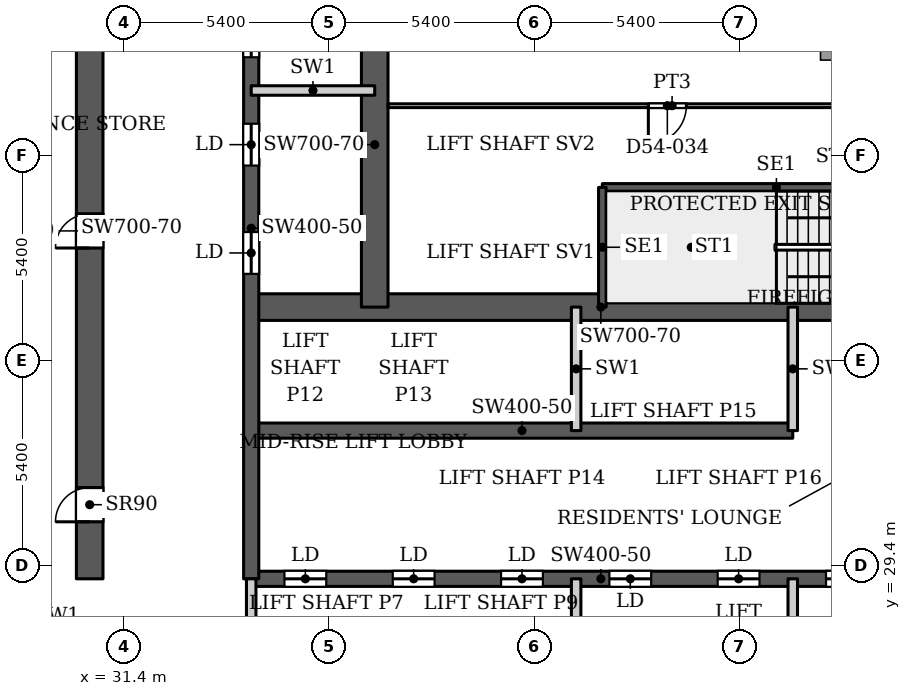
"""IFC4 building model, lengths in metres.
Left out: names, types, materials, properties, quantities, classifications, styles, units other than length and angle.
Written with IfcOpenShell. Run it as: python <this file> out.ifc"""

import sys

from ifc_helpers import new_model, si_unit, direction, frame, frame_2d, origin, place, context, subcontext, project, spatial, rectangle, extrude, source, transform, mapped, element, fill, save


model = new_model("IFC4")
c1 = context("Model", 3, precision=1e-05, world=origin(), true_north=direction((0.0, 1.0)))
c2 = subcontext(c1, "Body", "Model", "MODEL_VIEW")
j1 = project(units=[si_unit("LENGTHUNIT", "METRE"), si_unit("PLANEANGLEUNIT", "RADIAN")], contexts=[c1])
p1 = place(None, origin())
s1 = spatial("IfcSite", under=j1, at=p1, CompositionType="ELEMENT")
p2 = place(p1, origin())
s2 = spatial("IfcBuilding", under=s1, at=p2, CompositionType="ELEMENT")
p3 = place(p2, frame((0.0, 0.0, 235.7)))
s3 = spatial("IfcBuildingStorey", under=s2, at=p3, CompositionType="ELEMENT", Elevation=235.7)
p4 = place(p3, frame((34.75, 29.05, 0.0), z_axis=(0.0, 0.0, 1.0), x_axis=(1.0, 0.0, 0.0)))
e1 = element("IfcWall", 1, at=p4, inside=s3, PredefinedType="SHEAR", context=c2, shape_type="SweptSolid", body=[
    extrude(rectangle(XDim=18.4, YDim=0.4, at=frame_2d((9.2, 0.0))), origin(), (0.0, 0.0, 1.0), 3.9),
])
p5 = place(p4, frame((0.875, 0.0, 0.0)))
e2 = element("IfcOpeningElement", 2, at=p5, cuts=e1, PredefinedType="OPENING", context=c2, shape_type="SweptSolid", body=[
    extrude(rectangle(XDim=1.1, YDim=2.2, at=frame_2d((0.55, 1.1))), frame((0.0, 0.21, 0.0), z_axis=(0.0, -1.0, 0.0), x_axis=(1.0, 0.0, 0.0)), (0.0, 0.0, 1.0), 0.42),
])
p6 = place(p4, frame((3.725, 0.0, 0.0)))
e3 = element("IfcOpeningElement", 3, at=p6, cuts=e1, PredefinedType="OPENING", context=c2, shape_type="SweptSolid", body=[
    extrude(rectangle(XDim=1.1, YDim=2.2, at=frame_2d((0.55, 1.1))), frame((0.0, 0.21, 0.0), z_axis=(0.0, -1.0, 0.0), x_axis=(1.0, 0.0, 0.0)), (0.0, 0.0, 1.0), 0.42),
])
p7 = place(p4, frame((6.575, 0.0, 0.0)))
e4 = element("IfcOpeningElement", 4, at=p7, cuts=e1, PredefinedType="OPENING", context=c2, shape_type="SweptSolid", body=[
    extrude(rectangle(XDim=1.1, YDim=2.2, at=frame_2d((0.55, 1.1))), frame((0.0, 0.21, 0.0), z_axis=(0.0, -1.0, 0.0), x_axis=(1.0, 0.0, 0.0)), (0.0, 0.0, 1.0), 0.42),
])
p8 = place(p4, frame((9.425, 0.0, 0.0)))
e5 = element("IfcOpeningElement", 5, at=p8, cuts=e1, PredefinedType="OPENING", context=c2, shape_type="SweptSolid", body=[
    extrude(rectangle(XDim=1.1, YDim=2.2, at=frame_2d((0.55, 1.1))), frame((0.0, 0.21, 0.0), z_axis=(0.0, -1.0, 0.0), x_axis=(1.0, 0.0, 0.0)), (0.0, 0.0, 1.0), 0.42),
])
p9 = place(p4, frame((12.275, 0.0, 0.0)))
e6 = element("IfcOpeningElement", 6, at=p9, cuts=e1, PredefinedType="OPENING", context=c2, shape_type="SweptSolid", body=[
    extrude(rectangle(XDim=1.1, YDim=2.2, at=frame_2d((0.55, 1.1))), frame((0.0, 0.21, 0.0), z_axis=(0.0, -1.0, 0.0), x_axis=(1.0, 0.0, 0.0)), (0.0, 0.0, 1.0), 0.42),
])
p10 = place(p4, frame((15.125, 0.0, 0.0)))
e7 = element("IfcOpeningElement", 7, at=p10, cuts=e1, PredefinedType="OPENING", context=c2, shape_type="SweptSolid", body=[
    extrude(rectangle(XDim=1.1, YDim=2.2, at=frame_2d((0.55, 1.1))), frame((0.0, 0.21, 0.0), z_axis=(0.0, -1.0, 0.0), x_axis=(1.0, 0.0, 0.0)), (0.0, 0.0, 1.0), 0.42),
])
p11 = place(p3, frame((34.75, 32.95, 0.0), z_axis=(0.0, 0.0, 1.0), x_axis=(1.0, 0.0, 0.0)))
e8 = element("IfcWall", 8, at=p11, inside=s3, PredefinedType="SHEAR", context=c2, shape_type="SweptSolid", body=[
    extrude(rectangle(XDim=14.25, YDim=0.4, at=frame_2d((7.125, 0.0))), origin(), (0.0, 0.0, 1.0), 3.9),
])
p12 = place(p3, frame((34.75, 36.2, 0.0), z_axis=(0.0, 0.0, 1.0), x_axis=(1.0, 0.0, 0.0)))
e9 = element("IfcWall", 9, at=p12, inside=s3, PredefinedType="SHEAR", context=c2, shape_type="SweptSolid", body=[
    extrude(rectangle(XDim=18.4, YDim=0.7, at=frame_2d((9.2, 0.0))), origin(), (0.0, 0.0, 1.0), 3.9),
])
p13 = place(p12, frame((16.9, 0.0, 0.0)))
e10 = element("IfcOpeningElement", 10, at=p13, cuts=e9, PredefinedType="OPENING", context=c2, shape_type="SweptSolid", body=[
    extrude(rectangle(XDim=1.0, YDim=2.2, at=frame_2d((0.5, 1.1))), frame((0.0, 0.36, 0.0), z_axis=(0.0, -1.0, 0.0), x_axis=(1.0, 0.0, 0.0)), (0.0, 0.0, 1.0), 0.72),
])
p14 = place(p3, frame((34.75, 29.05, 0.0), z_axis=(0.0, 0.0, 1.0), x_axis=(0.0, 1.0, 0.0)))
e11 = element("IfcWall", 11, at=p14, inside=s3, PredefinedType="SHEAR", context=c2, shape_type="SweptSolid", body=[
    extrude(rectangle(XDim=18.45, YDim=0.4, at=frame_2d((9.225, 0.0))), origin(), (0.0, 0.0, 1.0), 3.9),
])
p15 = place(p14, frame((8.025, 0.0, 0.0)))
e12 = element("IfcOpeningElement", 12, at=p15, cuts=e11, PredefinedType="OPENING", context=c2, shape_type="SweptSolid", body=[
    extrude(rectangle(XDim=1.1, YDim=2.2, at=frame_2d((0.55, 1.1))), frame((0.0, 0.21, 0.0), z_axis=(0.0, -1.0, 0.0), x_axis=(1.0, 0.0, 0.0)), (0.0, 0.0, 1.0), 0.42),
])
p16 = place(p14, frame((10.875, 0.0, 0.0)))
e13 = element("IfcOpeningElement", 13, at=p16, cuts=e11, PredefinedType="OPENING", context=c2, shape_type="SweptSolid", body=[
    extrude(rectangle(XDim=1.1, YDim=2.2, at=frame_2d((0.55, 1.1))), frame((0.0, 0.21, 0.0), z_axis=(0.0, -1.0, 0.0), x_axis=(1.0, 0.0, 0.0)), (0.0, 0.0, 1.0), 0.42),
])
p17 = place(p14, frame((13.725, 0.0, 0.0)))
e14 = element("IfcOpeningElement", 14, at=p17, cuts=e11, PredefinedType="OPENING", context=c2, shape_type="SweptSolid", body=[
    extrude(rectangle(XDim=1.1, YDim=2.2, at=frame_2d((0.55, 1.1))), frame((0.0, 0.21, 0.0), z_axis=(0.0, -1.0, 0.0), x_axis=(1.0, 0.0, 0.0)), (0.0, 0.0, 1.0), 0.42),
])
p18 = place(p14, frame((15.95, 0.0, 0.0)))
e15 = element("IfcOpeningElement", 15, at=p18, cuts=e11, PredefinedType="OPENING", context=c2, shape_type="SweptSolid", body=[
    extrude(rectangle(XDim=1.1, YDim=2.2, at=frame_2d((0.55, 1.1))), frame((0.0, 0.21, 0.0), z_axis=(0.0, -1.0, 0.0), x_axis=(1.0, 0.0, 0.0)), (0.0, 0.0, 1.0), 0.42),
])
p19 = place(p3, frame((38.0, 36.2, 0.0), z_axis=(0.0, 0.0, 1.0), x_axis=(0.0, 1.0, 0.0)))
e16 = element("IfcWall", 16, at=p19, inside=s3, PredefinedType="SHEAR", context=c2, shape_type="SweptSolid", body=[
    extrude(rectangle(XDim=8.55, YDim=0.7, at=frame_2d((4.275, 0.0))), origin(), (0.0, 0.0, 1.0), 3.9),
])
p20 = place(p3, frame((30.5, 29.05, 0.0), z_axis=(0.0, 0.0, 1.0), x_axis=(0.0, 1.0, 0.0)))
e17 = element("IfcWall", 17, at=p20, inside=s3, PredefinedType="SHEAR", context=c2, shape_type="SweptSolid", body=[
    extrude(rectangle(XDim=18.45, YDim=0.7, at=frame_2d((9.225, 0.0))), origin(), (0.0, 0.0, 1.0), 3.9),
])
p21 = place(p20, frame((1.5, 0.0, 0.0)))
e18 = element("IfcOpeningElement", 18, at=p21, cuts=e17, PredefinedType="OPENING", context=c2, shape_type="SweptSolid", body=[
    extrude(rectangle(XDim=0.9, YDim=2.2, at=frame_2d((0.45, 1.1))), frame((0.0, 0.36, 0.0), z_axis=(0.0, -1.0, 0.0), x_axis=(1.0, 0.0, 0.0)), (0.0, 0.0, 1.0), 0.72),
])
p22 = place(p20, frame((8.705, 0.0, 0.0)))
e19 = element("IfcOpeningElement", 19, at=p22, cuts=e17, PredefinedType="OPENING", context=c2, shape_type="SweptSolid", body=[
    extrude(rectangle(XDim=0.9, YDim=2.2, at=frame_2d((0.45, 1.1))), frame((0.0, 0.36, 0.0), z_axis=(0.0, -1.0, 0.0), x_axis=(1.0, 0.0, 0.0)), (0.0, 0.0, 1.0), 0.72),
])
p23 = place(p3, frame((29.712, 26.072, 0.0), z_axis=(0.0, 0.0, 1.0), x_axis=(-0.511028049012, 0.859564036662, 0.0)))
e20 = element("IfcWall", 20, at=p23, inside=s3, PredefinedType="SOLIDWALL", context=c2, shape_type="SweptSolid", body=[
    extrude(rectangle(XDim=4.634, YDim=0.25, at=frame_2d((2.317, 0.0))), origin(), (0.0, 0.0, 1.0), 3.217),
])
p24 = place(p3, frame((27.195, 31.969, 0.0), z_axis=(0.0, 0.0, 1.0), x_axis=(0.052555284099, 0.998618016117, 0.0)))
e21 = element("IfcWall", 21, at=p24, inside=s3, PredefinedType="SOLIDWALL", context=c2, shape_type="SweptSolid", body=[
    extrude(rectangle(XDim=61.38, YDim=0.25, at=frame_2d((30.69, 0.0))), origin(), (0.0, 0.0, 1.0), 3.75),
])
p25 = place(p3, frame((43.99, 39.35, 0.0), z_axis=(0.0, 0.0, 1.0), x_axis=(1.0, 0.0, 0.0)))
e22 = element("IfcWall", 22, at=p25, inside=s3, PredefinedType="SHEAR", context=c2, shape_type="SweptSolid", body=[
    extrude(rectangle(XDim=9.16, YDim=0.2, at=frame_2d((4.58, 0.0))), origin(), (0.0, 0.0, 1.0), 3.9),
])
p26 = place(p3, frame((43.99, 36.2, 0.0), z_axis=(0.0, 0.0, 1.0), x_axis=(0.0, 1.0, 0.0)))
e23 = element("IfcWall", 23, at=p26, inside=s3, PredefinedType="SHEAR", context=c2, shape_type="SweptSolid", body=[
    extrude(rectangle(XDim=3.15, YDim=0.2, at=frame_2d((1.575, 0.0))), origin(), (0.0, 0.0, 1.0), 3.9),
])
for number, where, z_axis, x_axis in (
    (24, (34.75, 25.8, 0.0), (0.0, 0.0, 1.0), (0.0, 1.0, 0.0)),
    (25, (43.3, 25.8, 0.0), (0.0, 0.0, 1.0), (0.0, 1.0, 0.0)),
    (26, (43.3, 32.95, 0.0), (0.0, 0.0, 1.0), (0.0, 1.0, 0.0)),
    (27, (49.0, 25.8, 0.0), (0.0, 0.0, 1.0), (0.0, 1.0, 0.0)),
    (28, (49.0, 32.95, 0.0), (0.0, 0.0, 1.0), (0.0, 1.0, 0.0)),
    (29, (34.75, 41.9, 0.0), (0.0, 0.0, 1.0), (1.0, 0.0, 0.0)),
):
    element("IfcWall", number, at=place(p3, frame(where, z_axis=z_axis, x_axis=x_axis)), inside=s3, PredefinedType="PARTITIONING", context=c2, shape_type="SweptSolid", body=[
        extrude(rectangle(XDim=3.25, YDim=0.25, at=frame_2d((1.625, 0.0))), origin(), (0.0, 0.0, 1.0), 3.9),
    ])
p27 = place(p3, frame((38.349, 41.5, 0.0), z_axis=(0.0, 0.0, 1.0), x_axis=(1.0, 0.0, 0.0)))
e30 = element("IfcWall", 30, at=p27, inside=s3, PredefinedType="PARTITIONING", context=c2, shape_type="SweptSolid", body=[
    extrude(rectangle(XDim=14.951, YDim=0.1, at=frame_2d((7.476, 0.0))), origin(), (0.0, 0.0, 1.0), 3.6),
])
p28 = place(p27, frame((6.851, 0.0, 0.0)))
e31 = element("IfcOpeningElement", 31, at=p28, cuts=e30, PredefinedType="OPENING", context=c2, shape_type="SweptSolid", body=[
    extrude(rectangle(XDim=1.0, YDim=2.1, at=frame_2d((0.5, 1.05))), frame((0.0, 0.06, 0.0), z_axis=(0.0, -1.0, 0.0), x_axis=(1.0, 0.0, 0.0)), (0.0, 0.0, 1.0), 0.12),
])
m1 = source(origin(), c2, "Body", "SweptSolid", [
    extrude(rectangle(XDim=1.1, YDim=2.2, at=frame_2d((0.55, 1.1))), frame((0.0, 0.025, 0.0), z_axis=(0.0, -1.0, 0.0), x_axis=(1.0, 0.0, 0.0)), (0.0, 0.0, 1.0), 0.05),
])
p29 = place(p5, origin())
e32 = element("IfcDoor", 32, at=p29, inside=s3, OperationType="SLIDING_TO_LEFT", PredefinedType="DOOR", context=c2, shape_type="MappedRepresentation", body=[
    mapped(m1, transform((0.0, 0.0, 0.0), x_axis=(1.0, 0.0, 0.0), y_axis=(0.0, 1.0, 0.0), z_axis=(0.0, 0.0, 1.0), scale=1.0)),
])
fill(e2, e32)
p30 = place(p6, origin())
e33 = element("IfcDoor", 33, at=p30, inside=s3, OperationType="SLIDING_TO_LEFT", PredefinedType="DOOR", context=c2, shape_type="MappedRepresentation", body=[
    mapped(m1, transform((0.0, 0.0, 0.0), x_axis=(1.0, 0.0, 0.0), y_axis=(0.0, 1.0, 0.0), z_axis=(0.0, 0.0, 1.0), scale=1.0)),
])
fill(e3, e33)
p31 = place(p7, origin())
e34 = element("IfcDoor", 34, at=p31, inside=s3, OperationType="SLIDING_TO_LEFT", PredefinedType="DOOR", context=c2, shape_type="MappedRepresentation", body=[
    mapped(m1, transform((0.0, 0.0, 0.0), x_axis=(1.0, 0.0, 0.0), y_axis=(0.0, 1.0, 0.0), z_axis=(0.0, 0.0, 1.0), scale=1.0)),
])
fill(e4, e34)
p32 = place(p8, origin())
e35 = element("IfcDoor", 35, at=p32, inside=s3, OperationType="SLIDING_TO_LEFT", PredefinedType="DOOR", context=c2, shape_type="MappedRepresentation", body=[
    mapped(m1, transform((0.0, 0.0, 0.0), x_axis=(1.0, 0.0, 0.0), y_axis=(0.0, 1.0, 0.0), z_axis=(0.0, 0.0, 1.0), scale=1.0)),
])
fill(e5, e35)
p33 = place(p9, origin())
e36 = element("IfcDoor", 36, at=p33, inside=s3, OperationType="SLIDING_TO_LEFT", PredefinedType="DOOR", context=c2, shape_type="MappedRepresentation", body=[
    mapped(m1, transform((0.0, 0.0, 0.0), x_axis=(1.0, 0.0, 0.0), y_axis=(0.0, 1.0, 0.0), z_axis=(0.0, 0.0, 1.0), scale=1.0)),
])
fill(e6, e36)
p34 = place(p15, origin())
e37 = element("IfcDoor", 37, at=p34, inside=s3, OperationType="SLIDING_TO_LEFT", PredefinedType="DOOR", context=c2, shape_type="MappedRepresentation", body=[
    mapped(m1, transform((0.0, 0.0, 0.0), x_axis=(1.0, 0.0, 0.0), y_axis=(0.0, 1.0, 0.0), z_axis=(0.0, 0.0, 1.0), scale=1.0)),
])
fill(e12, e37)
p35 = place(p16, origin())
e38 = element("IfcDoor", 38, at=p35, inside=s3, OperationType="SLIDING_TO_LEFT", PredefinedType="DOOR", context=c2, shape_type="MappedRepresentation", body=[
    mapped(m1, transform((0.0, 0.0, 0.0), x_axis=(1.0, 0.0, 0.0), y_axis=(0.0, 1.0, 0.0), z_axis=(0.0, 0.0, 1.0), scale=1.0)),
])
fill(e13, e38)
p36 = place(p17, origin())
e39 = element("IfcDoor", 39, at=p36, inside=s3, OperationType="SLIDING_TO_LEFT", PredefinedType="DOOR", context=c2, shape_type="MappedRepresentation", body=[
    mapped(m1, transform((0.0, 0.0, 0.0), x_axis=(1.0, 0.0, 0.0), y_axis=(0.0, 1.0, 0.0), z_axis=(0.0, 0.0, 1.0), scale=1.0)),
])
fill(e14, e39)
p37 = place(p10, origin())
e40 = element("IfcDoor", 40, at=p37, inside=s3, OperationType="SLIDING_TO_LEFT", PredefinedType="DOOR", context=c2, shape_type="MappedRepresentation", body=[
    mapped(m1, transform((0.0, 0.0, 0.0), x_axis=(1.0, 0.0, 0.0), y_axis=(0.0, 1.0, 0.0), z_axis=(0.0, 0.0, 1.0), scale=1.0)),
])
fill(e7, e40)
m2 = source(origin(), c2, "Body", "SweptSolid", [
    extrude(rectangle(XDim=0.9, YDim=2.2, at=frame_2d((0.45, 1.1))), frame((0.0, 0.025, 0.0), z_axis=(0.0, -1.0, 0.0), x_axis=(1.0, 0.0, 0.0)), (0.0, 0.0, 1.0), 0.05),
])
p38 = place(p21, origin())
e41 = element("IfcDoor", 41, at=p38, inside=s3, OperationType="SINGLE_SWING_LEFT", PredefinedType="DOOR", context=c2, shape_type="MappedRepresentation", body=[
    mapped(m2, transform((0.0, 0.0, 0.0), x_axis=(1.0, 0.0, 0.0), y_axis=(0.0, 1.0, 0.0), z_axis=(0.0, 0.0, 1.0), scale=1.0)),
])
fill(e18, e41)
p39 = place(p22, origin())
e42 = element("IfcDoor", 42, at=p39, inside=s3, OperationType="SINGLE_SWING_LEFT", PredefinedType="DOOR", context=c2, shape_type="MappedRepresentation", body=[
    mapped(m2, transform((0.0, 0.0, 0.0), x_axis=(1.0, 0.0, 0.0), y_axis=(0.0, 1.0, 0.0), z_axis=(0.0, 0.0, 1.0), scale=1.0)),
])
fill(e19, e42)
m3 = source(origin(), c2, "Body", "SweptSolid", [
    extrude(rectangle(XDim=1.0, YDim=2.1, at=frame_2d((0.5, 1.05))), frame((0.0, 0.025, 0.0), z_axis=(0.0, -1.0, 0.0), x_axis=(1.0, 0.0, 0.0)), (0.0, 0.0, 1.0), 0.05),
])
p40 = place(p28, origin())
e43 = element("IfcDoor", 43, at=p40, inside=s3, OperationType="SINGLE_SWING_RIGHT", PredefinedType="DOOR", context=c2, shape_type="MappedRepresentation", body=[
    mapped(m3, transform((0.0, 0.0, 0.0), x_axis=(1.0, 0.0, 0.0), y_axis=(0.0, 1.0, 0.0), z_axis=(0.0, 0.0, 1.0), scale=1.0)),
])
fill(e31, e43)
save(model, sys.argv[1])
